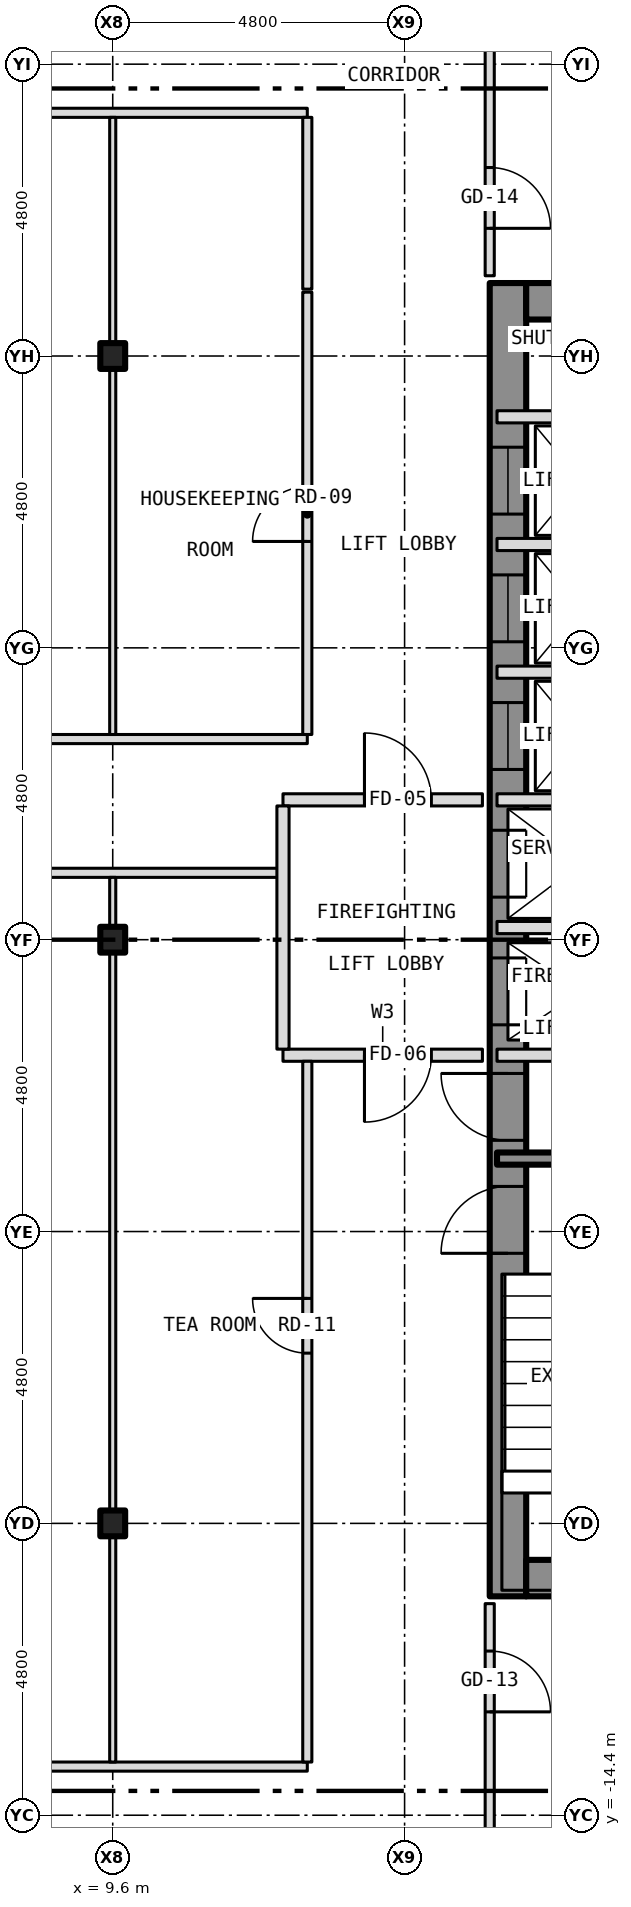
"""IFC4 building model, lengths in metres.
Left out: names, types, materials, properties, quantities, classifications, styles, units other than length and angle.
Written with IfcOpenShell. Run it as: python <this file> out.ifc"""

import sys

from ifc_helpers import new_model, si_unit, direction, frame, frame_2d, origin, origin_2d, place, context, subcontext, project, spatial, rectangle, i_section, extrude, element, fill, save


model = new_model("IFC4")
c1 = context("Model", 3, precision=1e-05, world=origin(), true_north=direction((0.0, 1.0)))
c2 = subcontext(c1, "Body", "Model", "MODEL_VIEW")
j1 = project(units=[si_unit("LENGTHUNIT", "METRE"), si_unit("PLANEANGLEUNIT", "RADIAN")], contexts=[c1])
p1 = place(None, origin())
s1 = spatial("IfcSite", under=j1, at=p1, CompositionType="ELEMENT")
p2 = place(p1, origin())
s2 = spatial("IfcBuilding", under=s1, at=p2, CompositionType="ELEMENT")
p3 = place(p2, frame((0.0, 0.0, 42.5)))
s3 = spatial("IfcBuildingStorey", under=s2, at=p3, CompositionType="ELEMENT", Elevation=42.5)
for number, where, z_axis, x_axis in (
    (1, (9.6, -9.6, -0.15), (0.0, 0.0, 1.0), (1.0, 0.0, 0.0)),
    (2, (9.6, 0.0, -0.15), (0.0, 0.0, 1.0), (1.0, 0.0, 0.0)),
    (3, (9.6, 9.6, -0.15), (0.0, 0.0, 1.0), (1.0, 0.0, 0.0)),
):
    element("IfcColumn", number, at=place(p3, frame(where, z_axis=z_axis, x_axis=x_axis)), inside=s3, PredefinedType="COLUMN", context=c2, shape_type="SweptSolid", body=[
        extrude(i_section(OverallWidth=0.409, OverallDepth=0.424, WebThickness=0.033, FlangeThickness=0.052, at=origin_2d()), origin(), (0.0, 0.0, 1.0), 3.5),
    ])
p4 = place(p3, frame((16.1, -10.8, 0.0), z_axis=(0.0, 0.0, 1.0), x_axis=(0.0, 1.0, 0.0)))
e4 = element("IfcWall", 4, at=p4, inside=s3, PredefinedType="SHEAR", context=c2, shape_type="SweptSolid", body=[
    extrude(rectangle(XDim=21.6, YDim=0.6, at=frame_2d((10.8, 0.0))), origin(), (0.0, 0.0, 1.0), 3.25),
])
p5 = place(p4, frame((9.4, 0.0, 0.0)))
e5 = element("IfcOpeningElement", 5, at=p5, cuts=e4, PredefinedType="OPENING", context=c2, shape_type="SweptSolid", body=[
    extrude(rectangle(XDim=1.1, YDim=2.1, at=frame_2d((0.55, 1.05))), frame((0.0, 0.312, 0.0), z_axis=(0.0, -1.0, 0.0), x_axis=(1.0, 0.0, 0.0)), (0.0, 0.0, 1.0), 0.624),
])
p6 = place(p4, frame((11.5, 0.0, 0.0)))
e6 = element("IfcOpeningElement", 6, at=p6, cuts=e4, PredefinedType="OPENING", context=c2, shape_type="SweptSolid", body=[
    extrude(rectangle(XDim=1.1, YDim=2.1, at=frame_2d((0.55, 1.05))), frame((0.0, 0.312, 0.0), z_axis=(0.0, -1.0, 0.0), x_axis=(1.0, 0.0, 0.0)), (0.0, 0.0, 1.0), 0.624),
])
p7 = place(p4, frame((13.6, 0.0, 0.0)))
e7 = element("IfcOpeningElement", 7, at=p7, cuts=e4, PredefinedType="OPENING", context=c2, shape_type="SweptSolid", body=[
    extrude(rectangle(XDim=1.1, YDim=2.1, at=frame_2d((0.55, 1.05))), frame((0.0, 0.312, 0.0), z_axis=(0.0, -1.0, 0.0), x_axis=(1.0, 0.0, 0.0)), (0.0, 0.0, 1.0), 0.624),
])
p8 = place(p4, frame((15.7, 0.0, 0.0)))
e8 = element("IfcOpeningElement", 8, at=p8, cuts=e4, PredefinedType="OPENING", context=c2, shape_type="SweptSolid", body=[
    extrude(rectangle(XDim=1.1, YDim=2.1, at=frame_2d((0.55, 1.05))), frame((0.0, 0.312, 0.0), z_axis=(0.0, -1.0, 0.0), x_axis=(1.0, 0.0, 0.0)), (0.0, 0.0, 1.0), 0.624),
])
p9 = place(p4, frame((17.8, 0.0, 0.0)))
e9 = element("IfcOpeningElement", 9, at=p9, cuts=e4, PredefinedType="OPENING", context=c2, shape_type="SweptSolid", body=[
    extrude(rectangle(XDim=1.1, YDim=2.1, at=frame_2d((0.55, 1.05))), frame((0.0, 0.312, 0.0), z_axis=(0.0, -1.0, 0.0), x_axis=(1.0, 0.0, 0.0)), (0.0, 0.0, 1.0), 0.624),
])
p10 = place(p4, frame((5.642, 0.0, 0.0)))
e10 = element("IfcOpeningElement", 10, at=p10, cuts=e4, PredefinedType="OPENING", context=c2, shape_type="SweptSolid", body=[
    extrude(rectangle(XDim=1.1, YDim=2.1, at=frame_2d((0.55, 1.05))), frame((0.0, 0.312, 0.0), z_axis=(0.0, -1.0, 0.0), x_axis=(1.0, 0.0, 0.0)), (0.0, 0.0, 1.0), 0.624),
])
p11 = place(p4, frame((7.5, 0.0, 0.0)))
e11 = element("IfcOpeningElement", 11, at=p11, cuts=e4, PredefinedType="OPENING", context=c2, shape_type="SweptSolid", body=[
    extrude(rectangle(XDim=1.1, YDim=2.1, at=frame_2d((0.55, 1.05))), frame((0.0, 0.312, 0.0), z_axis=(0.0, -1.0, 0.0), x_axis=(1.0, 0.0, 0.0)), (0.0, 0.0, 1.0), 0.624),
])
for number, where, z_axis, x_axis in (
    (12, (16.4, 10.5, 0.0), (0.0, 0.0, 1.0), (1.0, 0.0, 0.0)),
    (13, (16.4, -10.5, 0.0), (0.0, 0.0, 1.0), (1.0, 0.0, 0.0)),
):
    element("IfcWall", number, at=place(p3, frame(where, z_axis=z_axis, x_axis=x_axis)), inside=s3, PredefinedType="SHEAR", context=c2, shape_type="SweptSolid", body=[
        extrude(rectangle(XDim=7.0, YDim=0.6, at=frame_2d((3.5, 0.0))), origin(), (0.0, 0.0, 1.0), 3.25),
    ])
p12 = place(p3, frame((-12.8, -13.6, 0.0), z_axis=(0.0, 0.0, 1.0), x_axis=(1.0, 0.0, 0.0)))
e14 = element("IfcWall", 14, at=p12, inside=s3, PredefinedType="PARTITIONING", context=c2, shape_type="SweptSolid", body=[
    extrude(rectangle(XDim=25.6, YDim=0.15, at=frame_2d((12.8, 0.0))), origin(), (0.0, 0.0, 1.0), 3.35),
])
p13 = place(p12, frame((12.35, 0.0, 0.0)))
e15 = element("IfcOpeningElement", 15, at=p13, cuts=e14, PredefinedType="OPENING", context=c2, shape_type="SweptSolid", body=[
    extrude(rectangle(XDim=0.9, YDim=2.1, at=frame_2d((0.45, 1.05))), frame((0.0, 0.087, 0.0), z_axis=(0.0, -1.0, 0.0), x_axis=(1.0, 0.0, 0.0)), (0.0, 0.0, 1.0), 0.174),
])
p14 = place(p3, frame((15.92, -3.6, 0.0), z_axis=(0.0, 0.0, 1.0), x_axis=(1.0, 0.0, 0.0)))
e16 = element("IfcWall", 16, at=p14, inside=s3, PredefinedType="SHEAR", context=c2, shape_type="SweptSolid", body=[
    extrude(rectangle(XDim=4.08, YDim=0.2, at=frame_2d((2.04, 0.0))), origin(), (0.0, 0.0, 1.0), 3.25),
])
p15 = place(p3, frame((12.4, -1.9, 0.0), z_axis=(0.0, 0.0, 1.0), x_axis=(1.0, 0.0, 0.0)))
e17 = element("IfcWall", 17, at=p15, inside=s3, PredefinedType="PARTITIONING", context=c2, shape_type="SweptSolid", body=[
    extrude(rectangle(XDim=3.28, YDim=0.2, at=frame_2d((1.64, 0.0))), origin(), (0.0, 0.0, 1.0), 3.35),
])
p16 = place(p15, frame((1.34, 0.0, 0.0)))
e18 = element("IfcOpeningElement", 18, at=p16, cuts=e17, PredefinedType="OPENING", context=c2, shape_type="SweptSolid", body=[
    extrude(rectangle(XDim=1.1, YDim=2.1, at=frame_2d((0.55, 1.05))), frame((0.0, 0.112, 0.0), z_axis=(0.0, -1.0, 0.0), x_axis=(1.0, 0.0, 0.0)), (0.0, 0.0, 1.0), 0.224),
])
p17 = place(p3, frame((15.92, -1.9, 0.0), z_axis=(0.0, 0.0, 1.0), x_axis=(1.0, 0.0, 0.0)))
e19 = element("IfcWall", 19, at=p17, inside=s3, PredefinedType="PARTITIONING", context=c2, shape_type="SweptSolid", body=[
    extrude(rectangle(XDim=7.96, YDim=0.2, at=frame_2d((3.98, 0.0))), origin(), (0.0, 0.0, 1.0), 3.25),
])
p18 = place(p3, frame((15.92, 0.2, 0.0), z_axis=(0.0, 0.0, 1.0), x_axis=(1.0, 0.0, 0.0)))
e20 = element("IfcWall", 20, at=p18, inside=s3, PredefinedType="PARTITIONING", context=c2, shape_type="SweptSolid", body=[
    extrude(rectangle(XDim=2.88, YDim=0.2, at=frame_2d((1.44, 0.0))), origin(), (0.0, 0.0, 1.0), 3.25),
])
p19 = place(p3, frame((-12.4, 1.1, 0.0), z_axis=(0.0, 0.0, 1.0), x_axis=(1.0, 0.0, 0.0)))
e21 = element("IfcWall", 21, at=p19, inside=s3, PredefinedType="PARTITIONING", context=c2, shape_type="SweptSolid", body=[
    extrude(rectangle(XDim=24.8, YDim=0.15, at=frame_2d((12.4, 0.0))), origin(), (0.0, 0.0, 1.0), 3.35),
])
p20 = place(p3, frame((12.4, 2.3, 0.0), z_axis=(0.0, 0.0, 1.0), x_axis=(1.0, 0.0, 0.0)))
e22 = element("IfcWall", 22, at=p20, inside=s3, PredefinedType="PARTITIONING", context=c2, shape_type="SweptSolid", body=[
    extrude(rectangle(XDim=3.28, YDim=0.2, at=frame_2d((1.64, 0.0))), origin(), (0.0, 0.0, 1.0), 3.35),
])
p21 = place(p20, frame((1.34, 0.0, 0.0)))
e23 = element("IfcOpeningElement", 23, at=p21, cuts=e22, PredefinedType="OPENING", context=c2, shape_type="SweptSolid", body=[
    extrude(rectangle(XDim=1.1, YDim=2.1, at=frame_2d((0.55, 1.05))), frame((0.0, 0.112, 0.0), z_axis=(0.0, -1.0, 0.0), x_axis=(1.0, 0.0, 0.0)), (0.0, 0.0, 1.0), 0.224),
])
p22 = place(p3, frame((15.92, 2.3, 0.0), z_axis=(0.0, 0.0, 1.0), x_axis=(1.0, 0.0, 0.0)))
e24 = element("IfcWall", 24, at=p22, inside=s3, PredefinedType="PARTITIONING", context=c2, shape_type="SweptSolid", body=[
    extrude(rectangle(XDim=2.88, YDim=0.2, at=frame_2d((1.44, 0.0))), origin(), (0.0, 0.0, 1.0), 3.25),
])
p23 = place(p3, frame((-12.8, 3.3, 0.0), z_axis=(0.0, 0.0, 1.0), x_axis=(1.0, 0.0, 0.0)))
e25 = element("IfcWall", 25, at=p23, inside=s3, PredefinedType="PARTITIONING", context=c2, shape_type="SweptSolid", body=[
    extrude(rectangle(XDim=25.6, YDim=0.15, at=frame_2d((12.8, 0.0))), origin(), (0.0, 0.0, 1.0), 3.35),
])
p24 = place(p23, frame((1.95, 0.0, 0.0)))
e26 = element("IfcOpeningElement", 26, at=p24, cuts=e25, PredefinedType="OPENING", context=c2, shape_type="SweptSolid", body=[
    extrude(rectangle(XDim=0.9, YDim=2.1, at=frame_2d((0.45, 1.05))), frame((0.0, 0.087, 0.0), z_axis=(0.0, -1.0, 0.0), x_axis=(1.0, 0.0, 0.0)), (0.0, 0.0, 1.0), 0.174),
])
for number, where, z_axis, x_axis in (
    (27, (15.92, 4.4, 0.0), (0.0, 0.0, 1.0), (1.0, 0.0, 0.0)),
    (28, (15.92, 6.5, 0.0), (0.0, 0.0, 1.0), (1.0, 0.0, 0.0)),
    (29, (15.92, 8.6, 0.0), (0.0, 0.0, 1.0), (1.0, 0.0, 0.0)),
):
    element("IfcWall", number, at=place(p3, frame(where, z_axis=z_axis, x_axis=x_axis)), inside=s3, PredefinedType="PARTITIONING", context=c2, shape_type="SweptSolid", body=[
        extrude(rectangle(XDim=2.88, YDim=0.2, at=frame_2d((1.44, 0.0))), origin(), (0.0, 0.0, 1.0), 3.25),
    ])
p25 = place(p3, frame((-12.8, 13.6, 0.0), z_axis=(0.0, 0.0, 1.0), x_axis=(1.0, 0.0, 0.0)))
e30 = element("IfcWall", 30, at=p25, inside=s3, PredefinedType="PARTITIONING", context=c2, shape_type="SweptSolid", body=[
    extrude(rectangle(XDim=25.6, YDim=0.15, at=frame_2d((12.8, 0.0))), origin(), (0.0, 0.0, 1.0), 3.35),
])
p26 = place(p25, frame((12.35, 0.0, 0.0)))
e31 = element("IfcOpeningElement", 31, at=p26, cuts=e30, PredefinedType="OPENING", context=c2, shape_type="SweptSolid", body=[
    extrude(rectangle(XDim=0.9, YDim=2.1, at=frame_2d((0.45, 1.05))), frame((0.0, 0.087, 0.0), z_axis=(0.0, -1.0, 0.0), x_axis=(1.0, 0.0, 0.0)), (0.0, 0.0, 1.0), 0.174),
])
p27 = place(p3, frame((9.6, -13.525, 0.0), z_axis=(0.0, 0.0, 1.0), x_axis=(0.0, 1.0, 0.0)))
e32 = element("IfcWall", 32, at=p27, inside=s3, PredefinedType="PARTITIONING", context=c2, shape_type="SweptSolid", body=[
    extrude(rectangle(XDim=3.721, YDim=0.1, at=frame_2d((1.86, 0.0))), origin(), (0.0, 0.0, 1.0), 2.728),
])
p28 = place(p3, frame((9.6, -9.804, 0.0), z_axis=(0.0, 0.0, 1.0), x_axis=(0.0, 1.0, 0.0)))
e33 = element("IfcWall", 33, at=p28, inside=s3, PredefinedType="PARTITIONING", context=c2, shape_type="SweptSolid", body=[
    extrude(rectangle(XDim=0.408, YDim=0.1, at=frame_2d((0.204, 0.0))), origin(), (0.0, 0.0, 1.0), 3.35),
])
p29 = place(p3, frame((9.6, -9.396, 0.0), z_axis=(0.0, 0.0, 1.0), x_axis=(0.0, 1.0, 0.0)))
e34 = element("IfcWall", 34, at=p29, inside=s3, PredefinedType="PARTITIONING", context=c2, shape_type="SweptSolid", body=[
    extrude(rectangle(XDim=9.192, YDim=0.1, at=frame_2d((4.596, 0.0))), origin(), (0.0, 0.0, 1.0), 2.728),
])
p30 = place(p3, frame((9.6, -0.204, 0.0), z_axis=(0.0, 0.0, 1.0), x_axis=(0.0, 1.0, 0.0)))
e35 = element("IfcWall", 35, at=p30, inside=s3, PredefinedType="PARTITIONING", context=c2, shape_type="SweptSolid", body=[
    extrude(rectangle(XDim=0.408, YDim=0.1, at=frame_2d((0.204, 0.0))), origin(), (0.0, 0.0, 1.0), 3.35),
])
p31 = place(p3, frame((9.6, 0.204, 0.0), z_axis=(0.0, 0.0, 1.0), x_axis=(0.0, 1.0, 0.0)))
e36 = element("IfcWall", 36, at=p31, inside=s3, PredefinedType="PARTITIONING", context=c2, shape_type="SweptSolid", body=[
    extrude(rectangle(XDim=0.821, YDim=0.1, at=frame_2d((0.41, 0.0))), origin(), (0.0, 0.0, 1.0), 2.728),
])
p32 = place(p3, frame((9.6, 3.375, 0.0), z_axis=(0.0, 0.0, 1.0), x_axis=(0.0, 1.0, 0.0)))
e37 = element("IfcWall", 37, at=p32, inside=s3, PredefinedType="PARTITIONING", context=c2, shape_type="SweptSolid", body=[
    extrude(rectangle(XDim=6.021, YDim=0.1, at=frame_2d((3.01, 0.0))), origin(), (0.0, 0.0, 1.0), 2.728),
])
p33 = place(p3, frame((9.6, 9.396, 0.0), z_axis=(0.0, 0.0, 1.0), x_axis=(0.0, 1.0, 0.0)))
e38 = element("IfcWall", 38, at=p33, inside=s3, PredefinedType="PARTITIONING", context=c2, shape_type="SweptSolid", body=[
    extrude(rectangle(XDim=0.408, YDim=0.1, at=frame_2d((0.204, 0.0))), origin(), (0.0, 0.0, 1.0), 3.35),
])
p34 = place(p3, frame((9.6, 9.804, 0.0), z_axis=(0.0, 0.0, 1.0), x_axis=(0.0, 1.0, 0.0)))
e39 = element("IfcWall", 39, at=p34, inside=s3, PredefinedType="PARTITIONING", context=c2, shape_type="SweptSolid", body=[
    extrude(rectangle(XDim=3.721, YDim=0.1, at=frame_2d((1.86, 0.0))), origin(), (0.0, 0.0, 1.0), 2.728),
])
p35 = place(p3, frame((12.4, -1.8, 0.0), z_axis=(0.0, 0.0, 1.0), x_axis=(0.0, 1.0, 0.0)))
e40 = element("IfcWall", 40, at=p35, inside=s3, PredefinedType="PARTITIONING", context=c2, shape_type="SweptSolid", body=[
    extrude(rectangle(XDim=4.0, YDim=0.2, at=frame_2d((2.0, 0.0))), origin(), (0.0, 0.0, 1.0), 3.35),
])
p36 = place(p3, frame((12.8, -13.525, 0.0), z_axis=(0.0, 0.0, 1.0), x_axis=(0.0, 1.0, 0.0)))
e41 = element("IfcWall", 41, at=p36, inside=s3, PredefinedType="PARTITIONING", context=c2, shape_type="SweptSolid", body=[
    extrude(rectangle(XDim=11.525, YDim=0.15, at=frame_2d((5.762, 0.0))), origin(), (0.0, 0.0, 1.0), 3.35),
])
p37 = place(p36, frame((6.725, 0.0, 0.0)))
e42 = element("IfcOpeningElement", 42, at=p37, cuts=e41, PredefinedType="OPENING", context=c2, shape_type="SweptSolid", body=[
    extrude(rectangle(XDim=0.9, YDim=2.1, at=frame_2d((0.45, 1.05))), frame((0.0, 0.087, 0.0), z_axis=(0.0, -1.0, 0.0), x_axis=(1.0, 0.0, 0.0)), (0.0, 0.0, 1.0), 0.174),
])
p38 = place(p3, frame((12.8, 3.375, 0.0), z_axis=(0.0, 0.0, 1.0), x_axis=(0.0, 1.0, 0.0)))
e43 = element("IfcWall", 43, at=p38, inside=s3, PredefinedType="PARTITIONING", context=c2, shape_type="SweptSolid", body=[
    extrude(rectangle(XDim=7.275, YDim=0.15, at=frame_2d((3.637, 0.0))), origin(), (0.0, 0.0, 1.0), 3.35),
])
p39 = place(p38, frame((3.175, 0.0, 0.0)))
e44 = element("IfcOpeningElement", 44, at=p39, cuts=e43, PredefinedType="OPENING", context=c2, shape_type="SweptSolid", body=[
    extrude(rectangle(XDim=0.9, YDim=2.1, at=frame_2d((0.45, 1.05))), frame((0.0, 0.087, 0.0), z_axis=(0.0, -1.0, 0.0), x_axis=(1.0, 0.0, 0.0)), (0.0, 0.0, 1.0), 0.174),
])
p40 = place(p3, frame((12.8, 10.7, 0.0), z_axis=(0.0, 0.0, 1.0), x_axis=(0.0, 1.0, 0.0)))
e45 = element("IfcWall", 45, at=p40, inside=s3, PredefinedType="PARTITIONING", context=c2, shape_type="SweptSolid", body=[
    extrude(rectangle(XDim=2.825, YDim=0.15, at=frame_2d((1.413, 0.0))), origin(), (0.0, 0.0, 1.0), 3.35),
])
p41 = place(p3, frame((15.8, -15.725, 0.0), z_axis=(0.0, 0.0, 1.0), x_axis=(0.0, 1.0, 0.0)))
e46 = element("IfcWall", 46, at=p41, inside=s3, PredefinedType="PARTITIONING", context=c2, shape_type="SweptSolid", body=[
    extrude(rectangle(XDim=4.805, YDim=0.15, at=frame_2d((2.403, 0.0))), origin(), (0.0, 0.0, 1.0), 3.35),
])
p42 = place(p41, frame((3.025, 0.0, 0.0)))
e47 = element("IfcOpeningElement", 47, at=p42, cuts=e46, PredefinedType="OPENING", context=c2, shape_type="SweptSolid", body=[
    extrude(rectangle(XDim=1.0, YDim=2.1, at=frame_2d((0.5, 1.05))), frame((0.0, 0.087, 0.0), z_axis=(0.0, -1.0, 0.0), x_axis=(1.0, 0.0, 0.0)), (0.0, 0.0, 1.0), 0.174),
])
p43 = place(p3, frame((15.8, 10.92, 0.0), z_axis=(0.0, 0.0, 1.0), x_axis=(0.0, 1.0, 0.0)))
e48 = element("IfcWall", 48, at=p43, inside=s3, PredefinedType="PARTITIONING", context=c2, shape_type="SweptSolid", body=[
    extrude(rectangle(XDim=4.805, YDim=0.15, at=frame_2d((2.403, 0.0))), origin(), (0.0, 0.0, 1.0), 3.35),
])
p44 = place(p43, frame((0.78, 0.0, 0.0)))
e49 = element("IfcOpeningElement", 49, at=p44, cuts=e48, PredefinedType="OPENING", context=c2, shape_type="SweptSolid", body=[
    extrude(rectangle(XDim=1.0, YDim=2.1, at=frame_2d((0.5, 1.05))), frame((0.0, 0.087, 0.0), z_axis=(0.0, -1.0, 0.0), x_axis=(1.0, 0.0, 0.0)), (0.0, 0.0, 1.0), 0.174),
])
p45 = place(p5, origin())
e50 = element("IfcDoor", 50, at=p45, inside=s3, OperationType="SLIDING_TO_LEFT", PredefinedType="DOOR", context=c2, shape_type="SweptSolid", body=[
    extrude(rectangle(XDim=1.1, YDim=2.1, at=frame_2d((0.55, 1.05))), frame((0.0, 0.025, 0.0), z_axis=(0.0, -1.0, 0.0), x_axis=(1.0, 0.0, 0.0)), (0.0, 0.0, 1.0), 0.05),
])
fill(e5, e50)
p46 = place(p6, origin())
e51 = element("IfcDoor", 51, at=p46, inside=s3, OperationType="SLIDING_TO_LEFT", PredefinedType="DOOR", context=c2, shape_type="SweptSolid", body=[
    extrude(rectangle(XDim=1.1, YDim=2.1, at=frame_2d((0.55, 1.05))), frame((0.0, 0.025, 0.0), z_axis=(0.0, -1.0, 0.0), x_axis=(1.0, 0.0, 0.0)), (0.0, 0.0, 1.0), 0.05),
])
fill(e6, e51)
p47 = place(p7, origin())
e52 = element("IfcDoor", 52, at=p47, inside=s3, OperationType="SLIDING_TO_LEFT", PredefinedType="DOOR", context=c2, shape_type="SweptSolid", body=[
    extrude(rectangle(XDim=1.1, YDim=2.1, at=frame_2d((0.55, 1.05))), frame((0.0, 0.025, 0.0), z_axis=(0.0, -1.0, 0.0), x_axis=(1.0, 0.0, 0.0)), (0.0, 0.0, 1.0), 0.05),
])
fill(e7, e52)
p48 = place(p8, origin())
e53 = element("IfcDoor", 53, at=p48, inside=s3, OperationType="SLIDING_TO_LEFT", PredefinedType="DOOR", context=c2, shape_type="SweptSolid", body=[
    extrude(rectangle(XDim=1.1, YDim=2.1, at=frame_2d((0.55, 1.05))), frame((0.0, 0.025, 0.0), z_axis=(0.0, -1.0, 0.0), x_axis=(1.0, 0.0, 0.0)), (0.0, 0.0, 1.0), 0.05),
])
fill(e8, e53)
p49 = place(p9, origin())
e54 = element("IfcDoor", 54, at=p49, inside=s3, OperationType="SLIDING_TO_LEFT", PredefinedType="DOOR", context=c2, shape_type="SweptSolid", body=[
    extrude(rectangle(XDim=1.1, YDim=2.1, at=frame_2d((0.55, 1.05))), frame((0.0, 0.025, 0.0), z_axis=(0.0, -1.0, 0.0), x_axis=(1.0, 0.0, 0.0)), (0.0, 0.0, 1.0), 0.05),
])
fill(e9, e54)
p50 = place(p10, origin())
e55 = element("IfcDoor", 55, at=p50, inside=s3, OperationType="SINGLE_SWING_LEFT", PredefinedType="DOOR", context=c2, shape_type="SweptSolid", body=[
    extrude(rectangle(XDim=1.1, YDim=2.1, at=frame_2d((0.55, 1.05))), frame((0.0, 0.025, 0.0), z_axis=(0.0, -1.0, 0.0), x_axis=(1.0, 0.0, 0.0)), (0.0, 0.0, 1.0), 0.05),
])
fill(e10, e55)
p51 = place(p11, origin())
e56 = element("IfcDoor", 56, at=p51, inside=s3, OperationType="SINGLE_SWING_RIGHT", PredefinedType="DOOR", context=c2, shape_type="SweptSolid", body=[
    extrude(rectangle(XDim=1.1, YDim=2.1, at=frame_2d((0.55, 1.05))), frame((0.0, 0.025, 0.0), z_axis=(0.0, -1.0, 0.0), x_axis=(1.0, 0.0, 0.0)), (0.0, 0.0, 1.0), 0.05),
])
fill(e11, e56)
p52 = place(p21, origin())
e57 = element("IfcDoor", 57, at=p52, inside=s3, OperationType="SINGLE_SWING_LEFT", PredefinedType="DOOR", context=c2, shape_type="SweptSolid", body=[
    extrude(rectangle(XDim=1.1, YDim=2.1, at=frame_2d((0.55, 1.05))), frame((0.0, 0.025, 0.0), z_axis=(0.0, -1.0, 0.0), x_axis=(1.0, 0.0, 0.0)), (0.0, 0.0, 1.0), 0.05),
])
fill(e23, e57)
p53 = place(p16, origin())
e58 = element("IfcDoor", 58, at=p53, inside=s3, OperationType="SINGLE_SWING_LEFT", PredefinedType="DOOR", context=c2, shape_type="SweptSolid", body=[
    extrude(rectangle(XDim=1.1, YDim=2.1, at=frame_2d((0.55, 1.05))), frame((0.0, 0.025, 0.0), z_axis=(0.0, -1.0, 0.0), x_axis=(1.0, 0.0, 0.0)), (0.0, 0.0, 1.0), 0.05),
])
fill(e18, e58)
p54 = place(p42, origin())
e59 = element("IfcDoor", 59, at=p54, inside=s3, OperationType="SINGLE_SWING_LEFT", PredefinedType="DOOR", context=c2, shape_type="SweptSolid", body=[
    extrude(rectangle(XDim=1.0, YDim=2.1, at=frame_2d((0.5, 1.05))), frame((0.0, 0.025, 0.0), z_axis=(0.0, -1.0, 0.0), x_axis=(1.0, 0.0, 0.0)), (0.0, 0.0, 1.0), 0.05),
])
fill(e47, e59)
p55 = place(p44, origin())
e60 = element("IfcDoor", 60, at=p55, inside=s3, OperationType="SINGLE_SWING_LEFT", PredefinedType="DOOR", context=c2, shape_type="SweptSolid", body=[
    extrude(rectangle(XDim=1.0, YDim=2.1, at=frame_2d((0.5, 1.05))), frame((0.0, 0.025, 0.0), z_axis=(0.0, -1.0, 0.0), x_axis=(1.0, 0.0, 0.0)), (0.0, 0.0, 1.0), 0.05),
])
fill(e49, e60)
p56 = place(p39, origin())
e61 = element("IfcDoor", 61, at=p56, inside=s3, OperationType="SINGLE_SWING_LEFT", PredefinedType="DOOR", context=c2, shape_type="SweptSolid", body=[
    extrude(rectangle(XDim=0.9, YDim=2.1, at=frame_2d((0.45, 1.05))), frame((0.0, 0.025, 0.0), z_axis=(0.0, -1.0, 0.0), x_axis=(1.0, 0.0, 0.0)), (0.0, 0.0, 1.0), 0.05),
])
fill(e44, e61)
p57 = place(p37, origin())
e62 = element("IfcDoor", 62, at=p57, inside=s3, OperationType="SINGLE_SWING_RIGHT", PredefinedType="DOOR", context=c2, shape_type="SweptSolid", body=[
    extrude(rectangle(XDim=0.9, YDim=2.1, at=frame_2d((0.45, 1.05))), frame((0.0, 0.025, 0.0), z_axis=(0.0, -1.0, 0.0), x_axis=(1.0, 0.0, 0.0)), (0.0, 0.0, 1.0), 0.05),
])
fill(e42, e62)
save(model, sys.argv[1])
